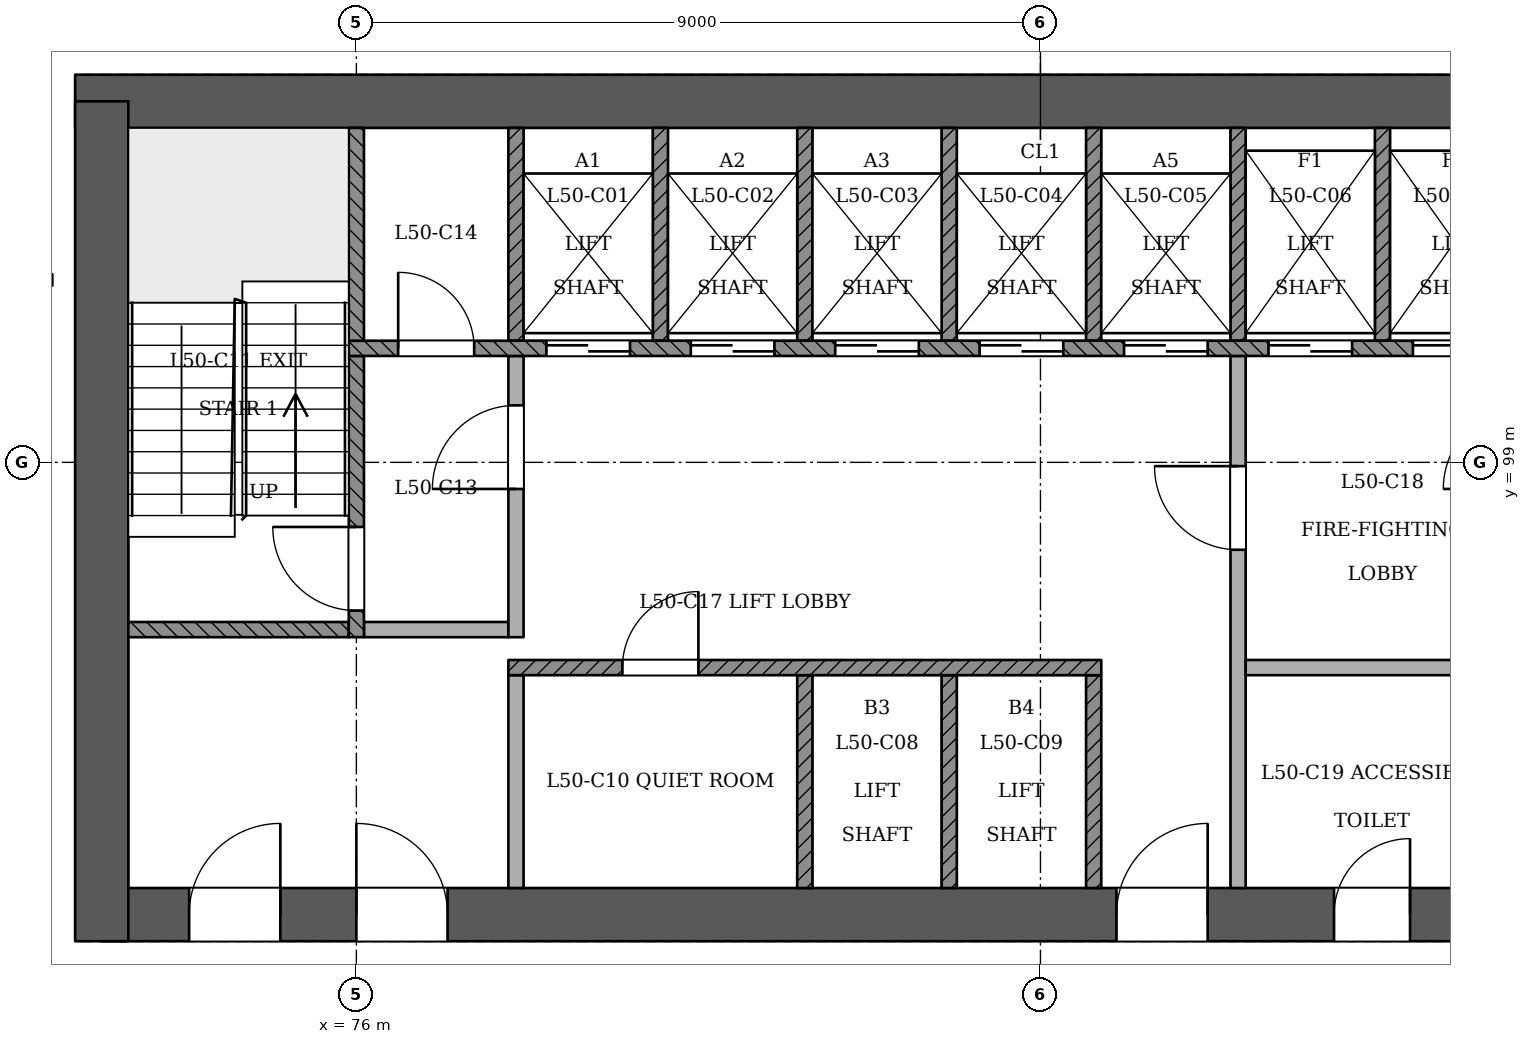
"""IFC4 building model, lengths in metres.
Left out: names, types, materials, properties, quantities, classifications, styles, units other than length and angle.
Written with IfcOpenShell. Run it as: python <this file> out.ifc"""

import sys

from ifc_helpers import new_model, si_unit, direction, frame, frame_2d, origin, place, context, subcontext, project, spatial, rectangle, extrude, element, fill, save


model = new_model("IFC4")
c1 = context("Model", 3, precision=1e-05, world=origin(), true_north=direction((0.0, 1.0)))
c2 = subcontext(c1, "Body", "Model", "MODEL_VIEW")
j1 = project(units=[si_unit("LENGTHUNIT", "METRE"), si_unit("PLANEANGLEUNIT", "RADIAN")], contexts=[c1])
p1 = place(None, origin())
s1 = spatial("IfcSite", under=j1, at=p1, CompositionType="ELEMENT")
p2 = place(p1, origin())
s2 = spatial("IfcBuilding", under=s1, at=p2, CompositionType="ELEMENT")
p3 = place(p2, frame((0.0, 0.0, 194.4)))
s3 = spatial("IfcBuildingStorey", under=s2, at=p3, CompositionType="ELEMENT", Elevation=194.4)
p4 = place(p3, frame((72.65, 93.05, 0.0), z_axis=(0.0, 0.0, 1.0), x_axis=(1.0, 0.0, 0.0)))
e1 = element("IfcWall", 1, at=p4, inside=s3, PredefinedType="SHEAR", context=c2, shape_type="SweptSolid", body=[
    extrude(rectangle(XDim=25.05, YDim=0.7, at=frame_2d((12.525, 0.0))), origin(), (0.0, 0.0, 1.0), 3.6),
])
p5 = place(p4, frame((1.15, 0.0, 0.0)))
e2 = element("IfcOpeningElement", 2, at=p5, cuts=e1, PredefinedType="OPENING", context=c2, shape_type="SweptSolid", body=[
    extrude(rectangle(XDim=1.2, YDim=2.1, at=frame_2d((0.6, 1.05))), frame((0.0, 0.36, 0.0), z_axis=(0.0, -1.0, 0.0), x_axis=(1.0, 0.0, 0.0)), (0.0, 0.0, 1.0), 0.721),
])
p6 = place(p4, frame((3.35, 0.0, 0.0)))
e3 = element("IfcOpeningElement", 3, at=p6, cuts=e1, PredefinedType="OPENING", context=c2, shape_type="SweptSolid", body=[
    extrude(rectangle(XDim=1.2, YDim=2.1, at=frame_2d((0.6, 1.05))), frame((0.0, 0.36, 0.0), z_axis=(0.0, -1.0, 0.0), x_axis=(1.0, 0.0, 0.0)), (0.0, 0.0, 1.0), 0.721),
])
p7 = place(p4, frame((13.35, 0.0, 0.0)))
e4 = element("IfcOpeningElement", 4, at=p7, cuts=e1, PredefinedType="OPENING", context=c2, shape_type="SweptSolid", body=[
    extrude(rectangle(XDim=1.2, YDim=2.1, at=frame_2d((0.6, 1.05))), frame((0.0, 0.36, 0.0), z_axis=(0.0, -1.0, 0.0), x_axis=(1.0, 0.0, 0.0)), (0.0, 0.0, 1.0), 0.721),
])
p8 = place(p4, frame((16.212, 0.0, 0.0)))
e5 = element("IfcOpeningElement", 5, at=p8, cuts=e1, PredefinedType="OPENING", context=c2, shape_type="SweptSolid", body=[
    extrude(rectangle(XDim=1.0, YDim=2.1, at=frame_2d((0.5, 1.05))), frame((0.0, 0.36, 0.0), z_axis=(0.0, -1.0, 0.0), x_axis=(1.0, 0.0, 0.0)), (0.0, 0.0, 1.0), 0.721),
])
p9 = place(p4, frame((19.65, 0.0, 0.0)))
e6 = element("IfcOpeningElement", 6, at=p9, cuts=e1, PredefinedType="OPENING", context=c2, shape_type="SweptSolid", body=[
    extrude(rectangle(XDim=1.0, YDim=2.1, at=frame_2d((0.5, 1.05))), frame((0.0, 0.36, 0.0), z_axis=(0.0, -1.0, 0.0), x_axis=(1.0, 0.0, 0.0)), (0.0, 0.0, 1.0), 0.721),
])
p10 = place(p4, frame((22.637, 0.0, 0.0)))
e7 = element("IfcOpeningElement", 7, at=p10, cuts=e1, PredefinedType="OPENING", context=c2, shape_type="SweptSolid", body=[
    extrude(rectangle(XDim=1.0, YDim=2.1, at=frame_2d((0.5, 1.05))), frame((0.0, 0.36, 0.0), z_axis=(0.0, -1.0, 0.0), x_axis=(1.0, 0.0, 0.0)), (0.0, 0.0, 1.0), 0.721),
])
p11 = place(p3, frame((97.35, 103.75, 0.0), z_axis=(0.0, 0.0, 1.0), x_axis=(-1.0, 0.0, 0.0)))
e8 = element("IfcWall", 8, at=p11, inside=s3, PredefinedType="SHEAR", context=c2, shape_type="SweptSolid", body=[
    extrude(rectangle(XDim=25.05, YDim=0.7, at=frame_2d((12.525, 0.0))), origin(), (0.0, 0.0, 1.0), 3.6),
])
p12 = place(p3, frame((72.65, 103.75, 0.0), z_axis=(0.0, 0.0, 1.0), x_axis=(0.0, -1.0, 0.0)))
e9 = element("IfcWall", 9, at=p12, inside=s3, PredefinedType="SHEAR", context=c2, shape_type="SweptSolid", body=[
    extrude(rectangle(XDim=11.05, YDim=0.7, at=frame_2d((5.525, 0.0))), origin(), (0.0, 0.0, 1.0), 3.6),
])
p13 = place(p3, frame((78.1, 93.4, 0.0), z_axis=(0.0, 0.0, 1.0), x_axis=(0.0, 1.0, 0.0)))
e10 = element("IfcWall", 10, at=p13, inside=s3, PredefinedType="PARTITIONING", context=c2, shape_type="SweptSolid", body=[
    extrude(rectangle(XDim=2.8, YDim=0.2, at=frame_2d((1.4, 0.0))), origin(), (0.0, 0.0, 1.0), 3.15),
])
for number, where, z_axis, x_axis in (
    (11, (81.9, 93.4, 0.0), (0.0, 0.0, 1.0), (0.0, 1.0, 0.0)),
    (12, (83.8, 93.4, 0.0), (0.0, 0.0, 1.0), (0.0, 1.0, 0.0)),
    (13, (85.7, 93.4, 0.0), (0.0, 0.0, 1.0), (0.0, 1.0, 0.0)),
):
    element("IfcWall", number, at=place(p3, frame(where, z_axis=z_axis, x_axis=x_axis)), inside=s3, PredefinedType="SOLIDWALL", context=c2, shape_type="SweptSolid", body=[
        extrude(rectangle(XDim=2.8, YDim=0.2, at=frame_2d((1.4, 0.0))), origin(), (0.0, 0.0, 1.0), 3.15),
    ])
p14 = place(p3, frame((87.6, 93.4, 0.0), z_axis=(0.0, 0.0, 1.0), x_axis=(0.0, 1.0, 0.0)))
e14 = element("IfcWall", 14, at=p14, inside=s3, PredefinedType="PARTITIONING", context=c2, shape_type="SweptSolid", body=[
    extrude(rectangle(XDim=7.0, YDim=0.2, at=frame_2d((3.5, 0.0))), origin(), (0.0, 0.0, 1.0), 3.15),
])
p15 = place(p14, frame((4.45, 0.0, 0.0)))
e15 = element("IfcOpeningElement", 15, at=p15, cuts=e14, PredefinedType="OPENING", context=c2, shape_type="SweptSolid", body=[
    extrude(rectangle(XDim=1.1, YDim=2.1, at=frame_2d((0.55, 1.05))), frame((0.0, 0.11, 0.0), z_axis=(0.0, -1.0, 0.0), x_axis=(1.0, 0.0, 0.0)), (0.0, 0.0, 1.0), 0.221),
])
p16 = place(p3, frame((78.0, 96.3, 0.0), z_axis=(0.0, 0.0, 1.0), x_axis=(1.0, 0.0, 0.0)))
e16 = element("IfcWall", 16, at=p16, inside=s3, PredefinedType="SOLIDWALL", context=c2, shape_type="SweptSolid", body=[
    extrude(rectangle(XDim=7.8, YDim=0.2, at=frame_2d((3.9, 0.0))), origin(), (0.0, 0.0, 1.0), 3.15),
])
p17 = place(p16, frame((1.5, 0.0, 0.0)))
e17 = element("IfcOpeningElement", 17, at=p17, cuts=e16, PredefinedType="OPENING", context=c2, shape_type="SweptSolid", body=[
    extrude(rectangle(XDim=1.0, YDim=2.1, at=frame_2d((0.5, 1.05))), frame((0.0, 0.11, 0.0), z_axis=(0.0, -1.0, 0.0), x_axis=(1.0, 0.0, 0.0)), (0.0, 0.0, 1.0), 0.221),
])
p18 = place(p3, frame((87.7, 96.3, 0.0), z_axis=(0.0, 0.0, 1.0), x_axis=(1.0, 0.0, 0.0)))
e18 = element("IfcWall", 18, at=p18, inside=s3, PredefinedType="PARTITIONING", context=c2, shape_type="SweptSolid", body=[
    extrude(rectangle(XDim=3.6, YDim=0.2, at=frame_2d((1.8, 0.0))), origin(), (0.0, 0.0, 1.0), 3.15),
])
p19 = place(p3, frame((73.0, 96.8, 0.0), z_axis=(0.0, 0.0, 1.0), x_axis=(1.0, 0.0, 0.0)))
e19 = element("IfcWall", 19, at=p19, inside=s3, PredefinedType="SOLIDWALL", context=c2, shape_type="SweptSolid", body=[
    extrude(rectangle(XDim=2.9, YDim=0.2, at=frame_2d((1.45, 0.0))), origin(), (0.0, 0.0, 1.0), 3.15),
])
p20 = place(p3, frame((76.0, 96.7, 0.0), z_axis=(0.0, 0.0, 1.0), x_axis=(0.0, 1.0, 0.0)))
e20 = element("IfcWall", 20, at=p20, inside=s3, PredefinedType="SOLIDWALL", context=c2, shape_type="SweptSolid", body=[
    extrude(rectangle(XDim=3.7, YDim=0.2, at=frame_2d((1.85, 0.0))), origin(), (0.0, 0.0, 1.0), 3.15),
])
p21 = place(p20, frame((0.35, 0.0, 0.0)))
e21 = element("IfcOpeningElement", 21, at=p21, cuts=e20, PredefinedType="OPENING", context=c2, shape_type="SweptSolid", body=[
    extrude(rectangle(XDim=1.1, YDim=2.1, at=frame_2d((0.55, 1.05))), frame((0.0, 0.11, 0.0), z_axis=(0.0, -1.0, 0.0), x_axis=(1.0, 0.0, 0.0)), (0.0, 0.0, 1.0), 0.221),
])
p22 = place(p3, frame((76.1, 96.8, 0.0), z_axis=(0.0, 0.0, 1.0), x_axis=(1.0, 0.0, 0.0)))
e22 = element("IfcWall", 22, at=p22, inside=s3, PredefinedType="PARTITIONING", context=c2, shape_type="SweptSolid", body=[
    extrude(rectangle(XDim=1.9, YDim=0.2, at=frame_2d((0.95, 0.0))), origin(), (0.0, 0.0, 1.0), 3.15),
])
p23 = place(p3, frame((78.1, 96.7, 0.0), z_axis=(0.0, 0.0, 1.0), x_axis=(0.0, 1.0, 0.0)))
e23 = element("IfcWall", 23, at=p23, inside=s3, PredefinedType="PARTITIONING", context=c2, shape_type="SweptSolid", body=[
    extrude(rectangle(XDim=3.7, YDim=0.2, at=frame_2d((1.85, 0.0))), origin(), (0.0, 0.0, 1.0), 3.15),
])
p24 = place(p23, frame((1.95, 0.0, 0.0)))
e24 = element("IfcOpeningElement", 24, at=p24, cuts=e23, PredefinedType="OPENING", context=c2, shape_type="SweptSolid", body=[
    extrude(rectangle(XDim=1.1, YDim=2.1, at=frame_2d((0.55, 1.05))), frame((0.0, 0.11, 0.0), z_axis=(0.0, -1.0, 0.0), x_axis=(1.0, 0.0, 0.0)), (0.0, 0.0, 1.0), 0.221),
])
p25 = place(p3, frame((75.9, 100.5, 0.0), z_axis=(0.0, 0.0, 1.0), x_axis=(1.0, 0.0, 0.0)))
e25 = element("IfcWall", 25, at=p25, inside=s3, PredefinedType="SOLIDWALL", context=c2, shape_type="SweptSolid", body=[
    extrude(rectangle(XDim=18.2, YDim=0.2, at=frame_2d((9.1, 0.0))), origin(), (0.0, 0.0, 1.0), 3.15),
])
p26 = place(p25, frame((2.6, 0.0, 0.0)))
e26 = element("IfcOpeningElement", 26, at=p26, cuts=e25, PredefinedType="OPENING", context=c2, shape_type="SweptSolid", body=[
    extrude(rectangle(XDim=1.1, YDim=2.1, at=frame_2d((0.55, 1.05))), frame((0.0, 0.11, 0.0), z_axis=(0.0, -1.0, 0.0), x_axis=(1.0, 0.0, 0.0)), (0.0, 0.0, 1.0), 0.221),
])
p27 = place(p25, frame((4.5, 0.0, 0.0)))
e27 = element("IfcOpeningElement", 27, at=p27, cuts=e25, PredefinedType="OPENING", context=c2, shape_type="SweptSolid", body=[
    extrude(rectangle(XDim=1.1, YDim=2.1, at=frame_2d((0.55, 1.05))), frame((0.0, 0.11, 0.0), z_axis=(0.0, -1.0, 0.0), x_axis=(1.0, 0.0, 0.0)), (0.0, 0.0, 1.0), 0.221),
])
p28 = place(p25, frame((6.4, 0.0, 0.0)))
e28 = element("IfcOpeningElement", 28, at=p28, cuts=e25, PredefinedType="OPENING", context=c2, shape_type="SweptSolid", body=[
    extrude(rectangle(XDim=1.1, YDim=2.1, at=frame_2d((0.55, 1.05))), frame((0.0, 0.11, 0.0), z_axis=(0.0, -1.0, 0.0), x_axis=(1.0, 0.0, 0.0)), (0.0, 0.0, 1.0), 0.221),
])
p29 = place(p25, frame((8.3, 0.0, 0.0)))
e29 = element("IfcOpeningElement", 29, at=p29, cuts=e25, PredefinedType="OPENING", context=c2, shape_type="SweptSolid", body=[
    extrude(rectangle(XDim=1.1, YDim=2.1, at=frame_2d((0.55, 1.05))), frame((0.0, 0.11, 0.0), z_axis=(0.0, -1.0, 0.0), x_axis=(1.0, 0.0, 0.0)), (0.0, 0.0, 1.0), 0.221),
])
p30 = place(p25, frame((10.2, 0.0, 0.0)))
e30 = element("IfcOpeningElement", 30, at=p30, cuts=e25, PredefinedType="OPENING", context=c2, shape_type="SweptSolid", body=[
    extrude(rectangle(XDim=1.1, YDim=2.1, at=frame_2d((0.55, 1.05))), frame((0.0, 0.11, 0.0), z_axis=(0.0, -1.0, 0.0), x_axis=(1.0, 0.0, 0.0)), (0.0, 0.0, 1.0), 0.221),
])
p31 = place(p25, frame((12.1, 0.0, 0.0)))
e31 = element("IfcOpeningElement", 31, at=p31, cuts=e25, PredefinedType="OPENING", context=c2, shape_type="SweptSolid", body=[
    extrude(rectangle(XDim=1.1, YDim=2.1, at=frame_2d((0.55, 1.05))), frame((0.0, 0.11, 0.0), z_axis=(0.0, -1.0, 0.0), x_axis=(1.0, 0.0, 0.0)), (0.0, 0.0, 1.0), 0.221),
])
p32 = place(p25, frame((14.0, 0.0, 0.0)))
e32 = element("IfcOpeningElement", 32, at=p32, cuts=e25, PredefinedType="OPENING", context=c2, shape_type="SweptSolid", body=[
    extrude(rectangle(XDim=1.1, YDim=2.1, at=frame_2d((0.55, 1.05))), frame((0.0, 0.11, 0.0), z_axis=(0.0, -1.0, 0.0), x_axis=(1.0, 0.0, 0.0)), (0.0, 0.0, 1.0), 0.221),
])
p33 = place(p25, frame((0.65, 0.0, 0.0)))
e33 = element("IfcOpeningElement", 33, at=p33, cuts=e25, PredefinedType="OPENING", context=c2, shape_type="SweptSolid", body=[
    extrude(rectangle(XDim=1.0, YDim=2.1, at=frame_2d((0.5, 1.05))), frame((0.0, 0.11, 0.0), z_axis=(0.0, -1.0, 0.0), x_axis=(1.0, 0.0, 0.0)), (0.0, 0.0, 1.0), 0.221),
])
p34 = place(p25, frame((16.3, 0.0, 0.0)))
e34 = element("IfcOpeningElement", 34, at=p34, cuts=e25, PredefinedType="OPENING", context=c2, shape_type="SweptSolid", body=[
    extrude(rectangle(XDim=1.0, YDim=2.1, at=frame_2d((0.5, 1.05))), frame((0.0, 0.11, 0.0), z_axis=(0.0, -1.0, 0.0), x_axis=(1.0, 0.0, 0.0)), (0.0, 0.0, 1.0), 0.221),
])
for number, where, z_axis, x_axis in (
    (35, (76.0, 100.6, 0.0), (0.0, 0.0, 1.0), (0.0, 1.0, 0.0)),
    (36, (78.1, 100.6, 0.0), (0.0, 0.0, 1.0), (0.0, 1.0, 0.0)),
    (37, (80.0, 100.6, 0.0), (0.0, 0.0, 1.0), (0.0, 1.0, 0.0)),
    (38, (81.9, 100.6, 0.0), (0.0, 0.0, 1.0), (0.0, 1.0, 0.0)),
    (39, (83.8, 100.6, 0.0), (0.0, 0.0, 1.0), (0.0, 1.0, 0.0)),
    (40, (85.7, 100.6, 0.0), (0.0, 0.0, 1.0), (0.0, 1.0, 0.0)),
    (41, (87.6, 100.6, 0.0), (0.0, 0.0, 1.0), (0.0, 1.0, 0.0)),
    (42, (89.5, 100.6, 0.0), (0.0, 0.0, 1.0), (0.0, 1.0, 0.0)),
):
    element("IfcWall", number, at=place(p3, frame(where, z_axis=z_axis, x_axis=x_axis)), inside=s3, PredefinedType="SOLIDWALL", context=c2, shape_type="SweptSolid", body=[
        extrude(rectangle(XDim=2.8, YDim=0.2, at=frame_2d((1.4, 0.0))), origin(), (0.0, 0.0, 1.0), 3.15),
    ])
p35 = place(p26, origin())
e43 = element("IfcDoor", 43, at=p35, inside=s3, OperationType="SLIDING_TO_RIGHT", PredefinedType="NOTDEFINED", context=c2, shape_type="SweptSolid", body=[
    extrude(rectangle(XDim=1.1, YDim=2.1, at=frame_2d((0.55, 1.05))), frame((0.0, 0.025, 0.0), z_axis=(0.0, -1.0, 0.0), x_axis=(1.0, 0.0, 0.0)), (0.0, 0.0, 1.0), 0.05),
])
fill(e26, e43)
p36 = place(p27, origin())
e44 = element("IfcDoor", 44, at=p36, inside=s3, OperationType="SLIDING_TO_LEFT", PredefinedType="NOTDEFINED", context=c2, shape_type="SweptSolid", body=[
    extrude(rectangle(XDim=1.1, YDim=2.1, at=frame_2d((0.55, 1.05))), frame((0.0, 0.025, 0.0), z_axis=(0.0, -1.0, 0.0), x_axis=(1.0, 0.0, 0.0)), (0.0, 0.0, 1.0), 0.05),
])
fill(e27, e44)
p37 = place(p28, origin())
e45 = element("IfcDoor", 45, at=p37, inside=s3, OperationType="SLIDING_TO_RIGHT", PredefinedType="NOTDEFINED", context=c2, shape_type="SweptSolid", body=[
    extrude(rectangle(XDim=1.1, YDim=2.1, at=frame_2d((0.55, 1.05))), frame((0.0, 0.025, 0.0), z_axis=(0.0, -1.0, 0.0), x_axis=(1.0, 0.0, 0.0)), (0.0, 0.0, 1.0), 0.05),
])
fill(e28, e45)
p38 = place(p29, origin())
e46 = element("IfcDoor", 46, at=p38, inside=s3, OperationType="SLIDING_TO_LEFT", PredefinedType="NOTDEFINED", context=c2, shape_type="SweptSolid", body=[
    extrude(rectangle(XDim=1.1, YDim=2.1, at=frame_2d((0.55, 1.05))), frame((0.0, 0.025, 0.0), z_axis=(0.0, -1.0, 0.0), x_axis=(1.0, 0.0, 0.0)), (0.0, 0.0, 1.0), 0.05),
])
fill(e29, e46)
p39 = place(p30, origin())
e47 = element("IfcDoor", 47, at=p39, inside=s3, OperationType="SLIDING_TO_RIGHT", PredefinedType="NOTDEFINED", context=c2, shape_type="SweptSolid", body=[
    extrude(rectangle(XDim=1.1, YDim=2.1, at=frame_2d((0.55, 1.05))), frame((0.0, 0.025, 0.0), z_axis=(0.0, -1.0, 0.0), x_axis=(1.0, 0.0, 0.0)), (0.0, 0.0, 1.0), 0.05),
])
fill(e30, e47)
p40 = place(p31, origin())
e48 = element("IfcDoor", 48, at=p40, inside=s3, OperationType="SLIDING_TO_RIGHT", PredefinedType="NOTDEFINED", context=c2, shape_type="SweptSolid", body=[
    extrude(rectangle(XDim=1.1, YDim=2.1, at=frame_2d((0.55, 1.05))), frame((0.0, 0.025, 0.0), z_axis=(0.0, -1.0, 0.0), x_axis=(1.0, 0.0, 0.0)), (0.0, 0.0, 1.0), 0.05),
])
fill(e31, e48)
p41 = place(p32, origin())
e49 = element("IfcDoor", 49, at=p41, inside=s3, OperationType="SLIDING_TO_LEFT", PredefinedType="NOTDEFINED", context=c2, shape_type="SweptSolid", body=[
    extrude(rectangle(XDim=1.1, YDim=2.1, at=frame_2d((0.55, 1.05))), frame((0.0, 0.025, 0.0), z_axis=(0.0, -1.0, 0.0), x_axis=(1.0, 0.0, 0.0)), (0.0, 0.0, 1.0), 0.05),
])
fill(e32, e49)
p42 = place(p21, origin())
e50 = element("IfcDoor", 50, at=p42, inside=s3, OperationType="SINGLE_SWING_RIGHT", PredefinedType="NOTDEFINED", context=c2, shape_type="SweptSolid", body=[
    extrude(rectangle(XDim=1.1, YDim=2.1, at=frame_2d((0.55, 1.05))), frame((0.0, 0.025, 0.0), z_axis=(0.0, -1.0, 0.0), x_axis=(1.0, 0.0, 0.0)), (0.0, 0.0, 1.0), 0.05),
])
fill(e21, e50)
p43 = place(p24, origin())
e51 = element("IfcDoor", 51, at=p43, inside=s3, OperationType="SINGLE_SWING_LEFT", PredefinedType="NOTDEFINED", context=c2, shape_type="SweptSolid", body=[
    extrude(rectangle(XDim=1.1, YDim=2.1, at=frame_2d((0.55, 1.05))), frame((0.0, 0.025, 0.0), z_axis=(0.0, -1.0, 0.0), x_axis=(1.0, 0.0, 0.0)), (0.0, 0.0, 1.0), 0.05),
])
fill(e24, e51)
p44 = place(p15, origin())
e52 = element("IfcDoor", 52, at=p44, inside=s3, OperationType="SINGLE_SWING_RIGHT", PredefinedType="NOTDEFINED", context=c2, shape_type="SweptSolid", body=[
    extrude(rectangle(XDim=1.1, YDim=2.1, at=frame_2d((0.55, 1.05))), frame((0.0, 0.025, 0.0), z_axis=(0.0, -1.0, 0.0), x_axis=(1.0, 0.0, 0.0)), (0.0, 0.0, 1.0), 0.05),
])
fill(e15, e52)
p45 = place(p5, origin())
e53 = element("IfcDoor", 53, at=p45, inside=s3, OperationType="SINGLE_SWING_RIGHT", PredefinedType="NOTDEFINED", context=c2, shape_type="SweptSolid", body=[
    extrude(rectangle(XDim=1.2, YDim=2.1, at=frame_2d((0.6, 1.05))), frame((0.0, 0.025, 0.0), z_axis=(0.0, -1.0, 0.0), x_axis=(1.0, 0.0, 0.0)), (0.0, 0.0, 1.0), 0.05),
])
fill(e2, e53)
p46 = place(p6, origin())
e54 = element("IfcDoor", 54, at=p46, inside=s3, OperationType="SINGLE_SWING_LEFT", PredefinedType="NOTDEFINED", context=c2, shape_type="SweptSolid", body=[
    extrude(rectangle(XDim=1.2, YDim=2.1, at=frame_2d((0.6, 1.05))), frame((0.0, 0.025, 0.0), z_axis=(0.0, -1.0, 0.0), x_axis=(1.0, 0.0, 0.0)), (0.0, 0.0, 1.0), 0.05),
])
fill(e3, e54)
p47 = place(p7, origin())
e55 = element("IfcDoor", 55, at=p47, inside=s3, OperationType="SINGLE_SWING_RIGHT", PredefinedType="NOTDEFINED", context=c2, shape_type="SweptSolid", body=[
    extrude(rectangle(XDim=1.2, YDim=2.1, at=frame_2d((0.6, 1.05))), frame((0.0, 0.025, 0.0), z_axis=(0.0, -1.0, 0.0), x_axis=(1.0, 0.0, 0.0)), (0.0, 0.0, 1.0), 0.05),
])
fill(e4, e55)
p48 = place(p33, origin())
e56 = element("IfcDoor", 56, at=p48, inside=s3, OperationType="SINGLE_SWING_LEFT", PredefinedType="NOTDEFINED", context=c2, shape_type="SweptSolid", body=[
    extrude(rectangle(XDim=1.0, YDim=2.1, at=frame_2d((0.5, 1.05))), frame((0.0, 0.025, 0.0), z_axis=(0.0, -1.0, 0.0), x_axis=(1.0, 0.0, 0.0)), (0.0, 0.0, 1.0), 0.05),
])
fill(e33, e56)
p49 = place(p8, origin())
e57 = element("IfcDoor", 57, at=p49, inside=s3, OperationType="SINGLE_SWING_RIGHT", PredefinedType="NOTDEFINED", context=c2, shape_type="SweptSolid", body=[
    extrude(rectangle(XDim=1.0, YDim=2.1, at=frame_2d((0.5, 1.05))), frame((0.0, 0.025, 0.0), z_axis=(0.0, -1.0, 0.0), x_axis=(1.0, 0.0, 0.0)), (0.0, 0.0, 1.0), 0.05),
])
fill(e5, e57)
p50 = place(p17, origin())
e58 = element("IfcDoor", 58, at=p50, inside=s3, OperationType="SINGLE_SWING_RIGHT", PredefinedType="NOTDEFINED", context=c2, shape_type="SweptSolid", body=[
    extrude(rectangle(XDim=1.0, YDim=2.1, at=frame_2d((0.5, 1.05))), frame((0.0, 0.025, 0.0), z_axis=(0.0, -1.0, 0.0), x_axis=(1.0, 0.0, 0.0)), (0.0, 0.0, 1.0), 0.05),
])
fill(e17, e58)
save(model, sys.argv[1])
